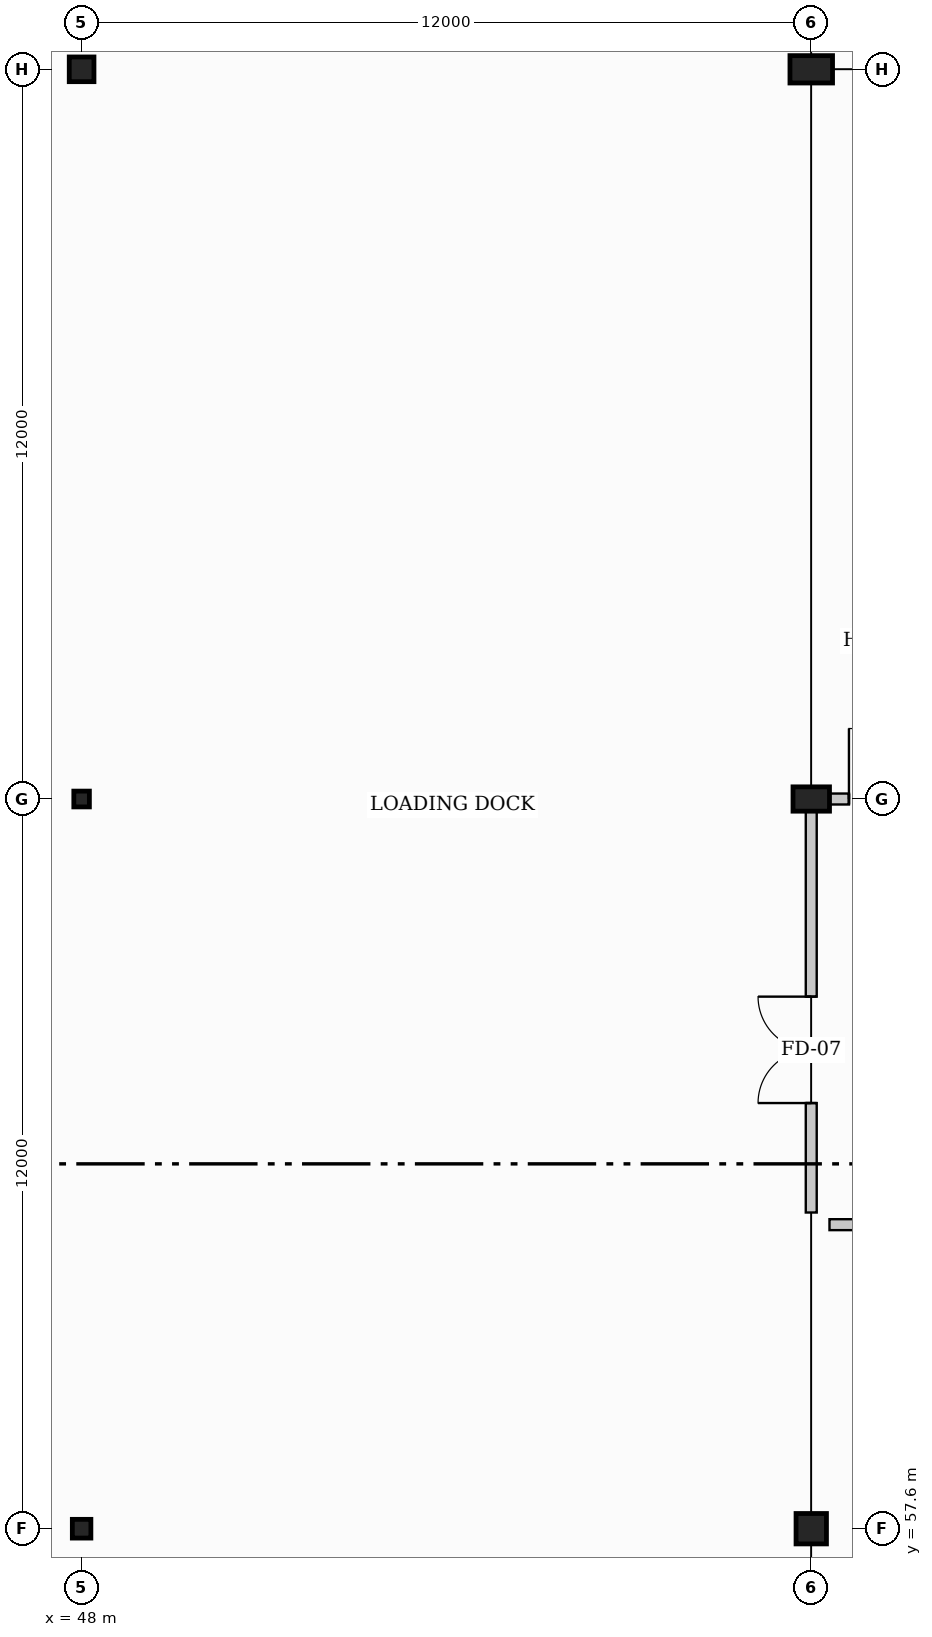
"""IFC4 building model, lengths in metres.
Left out: names, types, materials, properties, quantities, classifications, styles, units other than length and angle.
Written with IfcOpenShell. Run it as: python <this file> out.ifc"""

import sys

from ifc_helpers import new_model, si_unit, direction, frame, frame_2d, origin, origin_2d, place, context, subcontext, project, spatial, rectangle, hollow_circle, i_section, extrude, element, fill, save


model = new_model("IFC4")
c1 = context("Model", 3, precision=1e-05, world=origin(), true_north=direction((0.0, 1.0)))
c2 = subcontext(c1, "Body", "Model", "MODEL_VIEW")
j1 = project(units=[si_unit("LENGTHUNIT", "METRE"), si_unit("PLANEANGLEUNIT", "RADIAN")], contexts=[c1])
p1 = place(None, origin())
s1 = spatial("IfcSite", under=j1, at=p1, CompositionType="ELEMENT")
p2 = place(p1, origin())
s2 = spatial("IfcBuilding", under=s1, at=p2, CompositionType="ELEMENT")
p3 = place(p2, frame((0.0, 0.0, -4.8)))
s3 = spatial("IfcBuildingStorey", under=s2, at=p3, CompositionType="ELEMENT", Elevation=-4.8)
p4 = place(p3, frame((48.0, 57.6, 0.0), z_axis=(0.0, 0.0, 1.0), x_axis=(1.0, 0.0, 0.0)))
e1 = element("IfcColumn", 1, at=p4, inside=s3, PredefinedType="COLUMN", context=c2, shape_type="SweptSolid", body=[
    extrude(i_section(OverallWidth=0.305, OverallDepth=0.308, WebThickness=0.01, FlangeThickness=0.015, at=origin_2d()), origin(), (0.0, 0.0, 1.0), 4.8),
])
p5 = place(p3, frame((48.0, 69.6, 0.0), z_axis=(0.0, 0.0, 1.0), x_axis=(1.0, 0.0, 0.0)))
e2 = element("IfcColumn", 2, at=p5, inside=s3, PredefinedType="COLUMN", context=c2, shape_type="SweptSolid", body=[
    extrude(i_section(OverallWidth=0.256, OverallDepth=0.26, WebThickness=0.01, FlangeThickness=0.017, at=origin_2d()), origin(), (0.0, 0.0, 1.0), 4.8),
])
p6 = place(p3, frame((48.0, 81.6, 0.0), z_axis=(0.0, 0.0, 1.0), x_axis=(1.0, 0.0, 0.0)))
e3 = element("IfcColumn", 3, at=p6, inside=s3, PredefinedType="COLUMN", context=c2, shape_type="SweptSolid", body=[
    extrude(hollow_circle(Radius=0.203, WallThickness=0.016, at=origin_2d()), origin(), (0.0, 0.0, 1.0), 4.8),
])
p7 = place(p3, frame((60.0, 57.6, 0.0), z_axis=(0.0, 0.0, 1.0), x_axis=(0.0, 1.0, 0.0)))
e4 = element("IfcColumn", 4, at=p7, inside=s3, PredefinedType="COLUMN", context=c2, shape_type="SweptSolid", body=[
    extrude(rectangle(XDim=0.5, YDim=0.5, at=origin_2d()), origin(), (0.0, 0.0, 1.0), 4.8),
])
p8 = place(p3, frame((60.0, 69.6, 0.0), z_axis=(0.0, 0.0, 1.0), x_axis=(0.0, 1.0, 0.0)))
e5 = element("IfcColumn", 5, at=p8, inside=s3, PredefinedType="PILASTER", context=c2, shape_type="SweptSolid", body=[
    extrude(rectangle(XDim=0.4, YDim=0.6, at=origin_2d()), origin(), (0.0, 0.0, 1.0), 4.8),
])
p9 = place(p3, frame((60.0, 81.6, 0.0), z_axis=(0.0, 0.0, 1.0), x_axis=(0.0, 1.0, 0.0)))
e6 = element("IfcColumn", 6, at=p9, inside=s3, PredefinedType="PILASTER", context=c2, shape_type="SweptSolid", body=[
    extrude(rectangle(XDim=0.45, YDim=0.7, at=origin_2d()), origin(), (0.0, 0.0, 1.0), 4.8),
])
p10 = place(p3, frame((60.0, 62.8, 0.0), z_axis=(0.0, 0.0, 1.0), x_axis=(0.0, 1.0, 0.0)))
e7 = element("IfcWall", 7, at=p10, inside=s3, PredefinedType="PARTITIONING", context=c2, shape_type="SweptSolid", body=[
    extrude(rectangle(XDim=6.6, YDim=0.18, at=frame_2d((3.3, 0.0))), origin(), (0.0, 0.0, 1.0), 3.465),
])
p11 = place(p10, frame((1.8, 0.0, 0.0)))
e8 = element("IfcOpeningElement", 8, at=p11, cuts=e7, PredefinedType="OPENING", context=c2, shape_type="SweptSolid", body=[
    extrude(rectangle(XDim=1.75, YDim=2.25, at=frame_2d((0.875, 1.125))), frame((0.0, 0.1, 0.0), z_axis=(0.0, -1.0, 0.0), x_axis=(1.0, 0.0, 0.0)), (0.0, 0.0, 1.0), 0.2),
])
p12 = place(p3, frame((60.3, 62.6, 0.0), z_axis=(0.0, 0.0, 1.0), x_axis=(1.0, 0.0, 0.0)))
e9 = element("IfcWall", 9, at=p12, inside=s3, PredefinedType="PARTITIONING", context=c2, shape_type="SweptSolid", body=[
    extrude(rectangle(XDim=24.343, YDim=0.18, at=frame_2d((12.171, 0.0))), origin(), (0.0, 0.0, 1.0), 3.515),
])
p13 = place(p12, frame((11.521, 0.0, 0.0)))
e10 = element("IfcOpeningElement", 10, at=p13, cuts=e9, PredefinedType="OPENING", context=c2, shape_type="SweptSolid", body=[
    extrude(rectangle(XDim=1.9, YDim=2.25, at=frame_2d((0.95, 1.125))), frame((0.0, 0.1, 0.0), z_axis=(0.0, -1.0, 0.0), x_axis=(1.0, 0.0, 0.0)), (0.0, 0.0, 1.0), 0.2),
])
p14 = place(p3, frame((60.3, 69.6, 0.0), z_axis=(0.0, 0.0, 1.0), x_axis=(1.0, 0.0, 0.0)))
e11 = element("IfcWall", 11, at=p14, inside=s3, PredefinedType="PARTITIONING", context=c2, shape_type="SweptSolid", body=[
    extrude(rectangle(XDim=24.343, YDim=0.18, at=frame_2d((12.171, 0.0))), origin(), (0.0, 0.0, 1.0), 3.465),
])
p15 = place(p14, frame((0.32, 0.0, 0.0)))
e12 = element("IfcOpeningElement", 12, at=p15, cuts=e11, PredefinedType="OPENING", context=c2, shape_type="SweptSolid", body=[
    extrude(rectangle(XDim=1.16, YDim=2.1, at=frame_2d((0.58, 1.05))), frame((0.0, 0.1, 0.0), z_axis=(0.0, -1.0, 0.0), x_axis=(1.0, 0.0, 0.0)), (0.0, 0.0, 1.0), 0.2),
])
p16 = place(p11, origin())
e13 = element("IfcDoor", 13, at=p16, inside=s3, OperationType="DOUBLE_DOOR_SINGLE_SWING", PredefinedType="DOOR", context=c2, shape_type="SweptSolid", body=[
    extrude(rectangle(XDim=1.75, YDim=2.25, at=frame_2d((0.875, 1.125))), frame((0.0, 0.025, 0.0), z_axis=(0.0, -1.0, 0.0), x_axis=(1.0, 0.0, 0.0)), (0.0, 0.0, 1.0), 0.05),
])
fill(e8, e13)
p17 = place(p15, origin())
e14 = element("IfcDoor", 14, at=p17, inside=s3, OperationType="SINGLE_SWING_LEFT", PredefinedType="DOOR", context=c2, shape_type="SweptSolid", body=[
    extrude(rectangle(XDim=1.16, YDim=2.1, at=frame_2d((0.58, 1.05))), frame((0.0, 0.025, 0.0), z_axis=(0.0, -1.0, 0.0), x_axis=(1.0, 0.0, 0.0)), (0.0, 0.0, 1.0), 0.05),
])
fill(e12, e14)
save(model, sys.argv[1])
